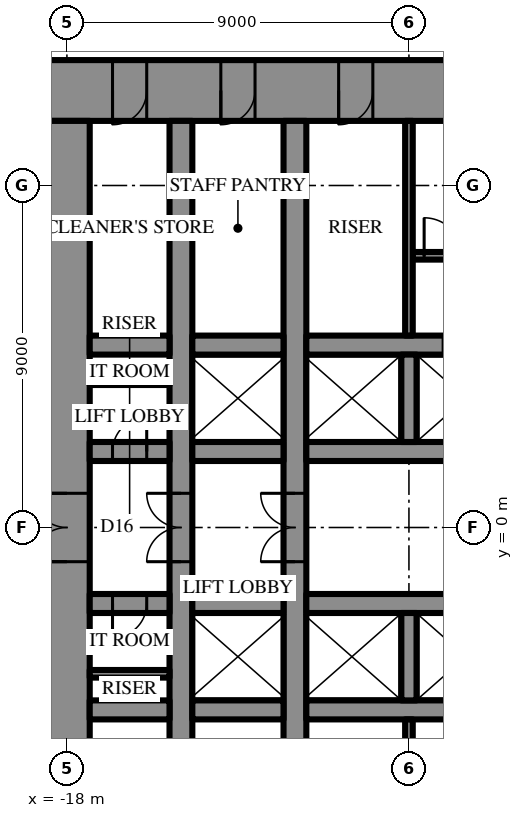
"""IFC4 building model, lengths in metres.
Left out: names, types, materials, properties, quantities, classifications, styles, units other than length and angle.
Written with IfcOpenShell. Run it as: python <this file> out.ifc"""

import sys

from ifc_helpers import new_model, si_unit, direction, frame, frame_2d, origin, place, context, subcontext, project, spatial, rectangle, extrude, element, fill, save


model = new_model("IFC4")
c1 = context("Model", 3, precision=1e-05, world=origin(), true_north=direction((0.0, 1.0)))
c2 = subcontext(c1, "Body", "Model", "MODEL_VIEW")
j1 = project(units=[si_unit("LENGTHUNIT", "METRE"), si_unit("PLANEANGLEUNIT", "RADIAN")], contexts=[c1])
p1 = place(None, origin())
s1 = spatial("IfcSite", under=j1, at=p1, CompositionType="ELEMENT")
p2 = place(p1, origin())
s2 = spatial("IfcBuilding", under=s1, at=p2, CompositionType="ELEMENT")
p3 = place(p2, frame((0.0, 0.0, 182.5)))
s3 = spatial("IfcBuildingStorey", under=s2, at=p3, CompositionType="ELEMENT", Elevation=182.5)
p4 = place(p3, frame((-18.6, 11.5, 0.0), z_axis=(0.0, 0.0, 1.0), x_axis=(1.0, 0.0, 0.0)))
e1 = element("IfcWall", 1, at=p4, inside=s3, PredefinedType="SHEAR", context=c2, shape_type="SweptSolid", body=[
    extrude(rectangle(XDim=37.2, YDim=1.6, at=frame_2d((18.6, 0.0))), origin(), (0.0, 0.0, 1.0), 4.2),
])
p5 = place(p4, frame((19.45, 0.0, 0.0)))
e2 = element("IfcOpeningElement", 2, at=p5, cuts=e1, PredefinedType="OPENING", context=c2, shape_type="SweptSolid", body=[
    extrude(rectangle(XDim=0.9, YDim=2.2, at=frame_2d((0.45, 1.1))), frame((0.0, 0.81, 0.0), z_axis=(0.0, -1.0, 0.0), x_axis=(1.0, 0.0, 0.0)), (0.0, 0.0, 1.0), 1.62),
])
p6 = place(p4, frame((22.45, 0.0, 0.0)))
e3 = element("IfcOpeningElement", 3, at=p6, cuts=e1, PredefinedType="OPENING", context=c2, shape_type="SweptSolid", body=[
    extrude(rectangle(XDim=0.9, YDim=2.2, at=frame_2d((0.45, 1.1))), frame((0.0, 0.81, 0.0), z_axis=(0.0, -1.0, 0.0), x_axis=(1.0, 0.0, 0.0)), (0.0, 0.0, 1.0), 1.62),
])
p7 = place(p4, frame((25.5, 0.0, 0.0)))
e4 = element("IfcOpeningElement", 4, at=p7, cuts=e1, PredefinedType="OPENING", context=c2, shape_type="SweptSolid", body=[
    extrude(rectangle(XDim=1.0, YDim=2.2, at=frame_2d((0.5, 1.1))), frame((0.0, 0.81, 0.0), z_axis=(0.0, -1.0, 0.0), x_axis=(1.0, 0.0, 0.0)), (0.0, 0.0, 1.0), 1.62),
])
p8 = place(p4, frame((1.8, 0.0, 0.0)))
e5 = element("IfcOpeningElement", 5, at=p8, cuts=e1, PredefinedType="OPENING", context=c2, shape_type="SweptSolid", body=[
    extrude(rectangle(XDim=0.9, YDim=2.2, at=frame_2d((0.45, 1.1))), frame((0.0, 0.81, 0.0), z_axis=(0.0, -1.0, 0.0), x_axis=(1.0, 0.0, 0.0)), (0.0, 0.0, 1.0), 1.62),
])
p9 = place(p4, frame((4.65, 0.0, 0.0)))
e6 = element("IfcOpeningElement", 6, at=p9, cuts=e1, PredefinedType="OPENING", context=c2, shape_type="SweptSolid", body=[
    extrude(rectangle(XDim=0.9, YDim=2.2, at=frame_2d((0.45, 1.1))), frame((0.0, 0.81, 0.0), z_axis=(0.0, -1.0, 0.0), x_axis=(1.0, 0.0, 0.0)), (0.0, 0.0, 1.0), 1.62),
])
p10 = place(p4, frame((7.75, 0.0, 0.0)))
e7 = element("IfcOpeningElement", 7, at=p10, cuts=e1, PredefinedType="OPENING", context=c2, shape_type="SweptSolid", body=[
    extrude(rectangle(XDim=0.9, YDim=2.2, at=frame_2d((0.45, 1.1))), frame((0.0, 0.81, 0.0), z_axis=(0.0, -1.0, 0.0), x_axis=(1.0, 0.0, 0.0)), (0.0, 0.0, 1.0), 1.62),
])
p11 = place(p4, frame((28.55, 0.0, 0.0)))
e8 = element("IfcOpeningElement", 8, at=p11, cuts=e1, PredefinedType="OPENING", context=c2, shape_type="SweptSolid", body=[
    extrude(rectangle(XDim=0.9, YDim=2.2, at=frame_2d((0.45, 1.1))), frame((0.0, 0.81, 0.0), z_axis=(0.0, -1.0, 0.0), x_axis=(1.0, 0.0, 0.0)), (0.0, 0.0, 1.0), 1.62),
])
p12 = place(p4, frame((31.65, 0.0, 0.0)))
e9 = element("IfcOpeningElement", 9, at=p12, cuts=e1, PredefinedType="OPENING", context=c2, shape_type="SweptSolid", body=[
    extrude(rectangle(XDim=0.9, YDim=2.2, at=frame_2d((0.45, 1.1))), frame((0.0, 0.81, 0.0), z_axis=(0.0, -1.0, 0.0), x_axis=(1.0, 0.0, 0.0)), (0.0, 0.0, 1.0), 1.62),
])
p13 = place(p4, frame((34.5, 0.0, 0.0)))
e10 = element("IfcOpeningElement", 10, at=p13, cuts=e1, PredefinedType="OPENING", context=c2, shape_type="SweptSolid", body=[
    extrude(rectangle(XDim=0.9, YDim=2.2, at=frame_2d((0.45, 1.1))), frame((0.0, 0.81, 0.0), z_axis=(0.0, -1.0, 0.0), x_axis=(1.0, 0.0, 0.0)), (0.0, 0.0, 1.0), 1.62),
])
p14 = place(p3, frame((-18.0, 10.7, 0.0), z_axis=(0.0, 0.0, 1.0), x_axis=(0.0, -1.0, 0.0)))
e11 = element("IfcWall", 11, at=p14, inside=s3, PredefinedType="SHEAR", context=c2, shape_type="SweptSolid", body=[
    extrude(rectangle(XDim=21.4, YDim=1.2, at=frame_2d((10.7, 0.0))), origin(), (0.0, 0.0, 1.0), 4.2),
])
p15 = place(p14, frame((9.8, 0.0, 0.0)))
e12 = element("IfcOpeningElement", 12, at=p15, cuts=e11, PredefinedType="OPENING", context=c2, shape_type="SweptSolid", body=[
    extrude(rectangle(XDim=1.8, YDim=2.4, at=frame_2d((0.9, 1.2))), frame((0.0, 0.61, 0.0), z_axis=(0.0, -1.0, 0.0), x_axis=(1.0, 0.0, 0.0)), (0.0, 0.0, 1.0), 1.22),
])
p16 = place(p3, frame((-12.0, -10.7, 0.0), z_axis=(0.0, 0.0, 1.0), x_axis=(0.0, 1.0, 0.0)))
e13 = element("IfcWall", 13, at=p16, inside=s3, PredefinedType="SHEAR", context=c2, shape_type="SweptSolid", body=[
    extrude(rectangle(XDim=21.4, YDim=0.6, at=frame_2d((10.7, 0.0))), origin(), (0.0, 0.0, 1.0), 4.2),
])
p17 = place(p16, frame((9.8, 0.0, 0.0)))
e14 = element("IfcOpeningElement", 14, at=p17, cuts=e13, PredefinedType="OPENING", context=c2, shape_type="SweptSolid", body=[
    extrude(rectangle(XDim=1.8, YDim=2.4, at=frame_2d((0.9, 1.2))), frame((0.0, 0.31, 0.0), z_axis=(0.0, -1.0, 0.0), x_axis=(1.0, 0.0, 0.0)), (0.0, 0.0, 1.0), 0.62),
])
p18 = place(p3, frame((-15.0, -10.7, 0.0), z_axis=(0.0, 0.0, 1.0), x_axis=(0.0, 1.0, 0.0)))
e15 = element("IfcWall", 15, at=p18, inside=s3, PredefinedType="SHEAR", context=c2, shape_type="SweptSolid", body=[
    extrude(rectangle(XDim=21.4, YDim=0.6, at=frame_2d((10.7, 0.0))), origin(), (0.0, 0.0, 1.0), 4.2),
])
p19 = place(p18, frame((9.8, 0.0, 0.0)))
e16 = element("IfcOpeningElement", 16, at=p19, cuts=e15, PredefinedType="OPENING", context=c2, shape_type="SweptSolid", body=[
    extrude(rectangle(XDim=1.8, YDim=2.4, at=frame_2d((0.9, 1.2))), frame((0.0, 0.31, 0.0), z_axis=(0.0, -1.0, 0.0), x_axis=(1.0, 0.0, 0.0)), (0.0, 0.0, 1.0), 0.62),
])
p20 = place(p3, frame((-17.4, 2.0, 0.0), z_axis=(0.0, 0.0, 1.0), x_axis=(1.0, 0.0, 0.0)))
e17 = element("IfcWall", 17, at=p20, inside=s3, PredefinedType="SHEAR", context=c2, shape_type="SweptSolid", body=[
    extrude(rectangle(XDim=2.1, YDim=0.5, at=frame_2d((1.05, 0.0))), origin(), (0.0, 0.0, 1.0), 4.2),
])
p21 = place(p20, frame((0.6, 0.0, 0.0)))
e18 = element("IfcOpeningElement", 18, at=p21, cuts=e17, PredefinedType="OPENING", context=c2, shape_type="SweptSolid", body=[
    extrude(rectangle(XDim=0.9, YDim=2.2, at=frame_2d((0.45, 1.1))), frame((0.0, 0.26, 0.0), z_axis=(0.0, -1.0, 0.0), x_axis=(1.0, 0.0, 0.0)), (0.0, 0.0, 1.0), 0.52),
])
p22 = place(p3, frame((-14.7, 2.0, 0.0), z_axis=(0.0, 0.0, 1.0), x_axis=(1.0, 0.0, 0.0)))
e19 = element("IfcWall", 19, at=p22, inside=s3, PredefinedType="SHEAR", context=c2, shape_type="SweptSolid", body=[
    extrude(rectangle(XDim=2.4, YDim=0.5, at=frame_2d((1.2, 0.0))), origin(), (0.0, 0.0, 1.0), 4.2),
])
p23 = place(p3, frame((-11.7, 2.0, 0.0), z_axis=(0.0, 0.0, 1.0), x_axis=(1.0, 0.0, 0.0)))
e20 = element("IfcWall", 20, at=p23, inside=s3, PredefinedType="SHEAR", context=c2, shape_type="SweptSolid", body=[
    extrude(rectangle(XDim=5.9, YDim=0.5, at=frame_2d((2.95, 0.0))), origin(), (0.0, 0.0, 1.0), 4.2),
])
p24 = place(p3, frame((-17.4, 4.8, 0.0), z_axis=(0.0, 0.0, 1.0), x_axis=(1.0, 0.0, 0.0)))
e21 = element("IfcWall", 21, at=p24, inside=s3, PredefinedType="SHEAR", context=c2, shape_type="SweptSolid", body=[
    extrude(rectangle(XDim=2.1, YDim=0.5, at=frame_2d((1.05, 0.0))), origin(), (0.0, 0.0, 1.0), 4.2),
])
p25 = place(p3, frame((-14.7, 4.8, 0.0), z_axis=(0.0, 0.0, 1.0), x_axis=(1.0, 0.0, 0.0)))
e22 = element("IfcWall", 22, at=p25, inside=s3, PredefinedType="SHEAR", context=c2, shape_type="SweptSolid", body=[
    extrude(rectangle(XDim=2.4, YDim=0.5, at=frame_2d((1.2, 0.0))), origin(), (0.0, 0.0, 1.0), 4.2),
])
p26 = place(p3, frame((-11.7, 4.8, 0.0), z_axis=(0.0, 0.0, 1.0), x_axis=(1.0, 0.0, 0.0)))
e23 = element("IfcWall", 23, at=p26, inside=s3, PredefinedType="SHEAR", context=c2, shape_type="SweptSolid", body=[
    extrude(rectangle(XDim=23.4, YDim=0.5, at=frame_2d((11.7, 0.0))), origin(), (0.0, 0.0, 1.0), 4.2),
])
p27 = place(p26, frame((6.6, 0.0, 0.0)))
e24 = element("IfcOpeningElement", 24, at=p27, cuts=e23, PredefinedType="OPENING", context=c2, shape_type="SweptSolid", body=[
    extrude(rectangle(XDim=1.2, YDim=2.2, at=frame_2d((0.6, 1.1))), frame((0.0, 0.26, 0.0), z_axis=(0.0, -1.0, 0.0), x_axis=(1.0, 0.0, 0.0)), (0.0, 0.0, 1.0), 0.52),
])
p28 = place(p26, frame((3.6, 0.0, 0.0)))
e25 = element("IfcOpeningElement", 25, at=p28, cuts=e23, PredefinedType="OPENING", context=c2, shape_type="SweptSolid", body=[
    extrude(rectangle(XDim=1.2, YDim=2.2, at=frame_2d((0.6, 1.1))), frame((0.0, 0.26, 0.0), z_axis=(0.0, -1.0, 0.0), x_axis=(1.0, 0.0, 0.0)), (0.0, 0.0, 1.0), 0.52),
])
p29 = place(p3, frame((-9.0, 2.25, 0.0), z_axis=(0.0, 0.0, 1.0), x_axis=(0.0, 1.0, 0.0)))
e26 = element("IfcWall", 26, at=p29, inside=s3, PredefinedType="SHEAR", context=c2, shape_type="SweptSolid", body=[
    extrude(rectangle(XDim=2.3, YDim=0.4, at=frame_2d((1.15, 0.0))), origin(), (0.0, 0.0, 1.0), 4.2),
])
p30 = place(p3, frame((-8.9, 7.15, 0.0), z_axis=(0.0, 0.0, 1.0), x_axis=(1.0, 0.0, 0.0)))
e27 = element("IfcWall", 27, at=p30, inside=s3, PredefinedType="SHEAR", context=c2, shape_type="SweptSolid", body=[
    extrude(rectangle(XDim=8.6, YDim=0.2, at=frame_2d((4.3, 0.0))), origin(), (0.0, 0.0, 1.0), 4.2),
])
p31 = place(p30, frame((0.3, 0.0, 0.0)))
e28 = element("IfcOpeningElement", 28, at=p31, cuts=e27, PredefinedType="OPENING", context=c2, shape_type="SweptSolid", body=[
    extrude(rectangle(XDim=1.0, YDim=2.2, at=frame_2d((0.5, 1.1))), frame((0.0, 0.11, 0.0), z_axis=(0.0, -1.0, 0.0), x_axis=(1.0, 0.0, 0.0)), (0.0, 0.0, 1.0), 0.22),
])
p32 = place(p3, frame((3.2, -2.0, 0.0), z_axis=(0.0, 0.0, 1.0), x_axis=(-1.0, 0.0, 0.0)))
e29 = element("IfcWall", 29, at=p32, inside=s3, PredefinedType="SHEAR", context=c2, shape_type="SweptSolid", body=[
    extrude(rectangle(XDim=14.9, YDim=0.5, at=frame_2d((7.45, 0.0))), origin(), (0.0, 0.0, 1.0), 4.2),
])
p33 = place(p32, frame((1.15, 0.0, 0.0)))
e30 = element("IfcOpeningElement", 30, at=p33, cuts=e29, PredefinedType="OPENING", context=c2, shape_type="SweptSolid", body=[
    extrude(rectangle(XDim=1.1, YDim=2.2, at=frame_2d((0.55, 1.1))), frame((0.0, 0.26, 0.0), z_axis=(0.0, -1.0, 0.0), x_axis=(1.0, 0.0, 0.0)), (0.0, 0.0, 1.0), 0.52),
])
p34 = place(p32, frame((4.15, 0.0, 0.0)))
e31 = element("IfcOpeningElement", 31, at=p34, cuts=e29, PredefinedType="OPENING", context=c2, shape_type="SweptSolid", body=[
    extrude(rectangle(XDim=1.1, YDim=2.2, at=frame_2d((0.55, 1.1))), frame((0.0, 0.26, 0.0), z_axis=(0.0, -1.0, 0.0), x_axis=(1.0, 0.0, 0.0)), (0.0, 0.0, 1.0), 0.52),
])
p35 = place(p32, frame((7.15, 0.0, 0.0)))
e32 = element("IfcOpeningElement", 32, at=p35, cuts=e29, PredefinedType="OPENING", context=c2, shape_type="SweptSolid", body=[
    extrude(rectangle(XDim=1.1, YDim=2.2, at=frame_2d((0.55, 1.1))), frame((0.0, 0.26, 0.0), z_axis=(0.0, -1.0, 0.0), x_axis=(1.0, 0.0, 0.0)), (0.0, 0.0, 1.0), 0.52),
])
p36 = place(p32, frame((10.15, 0.0, 0.0)))
e33 = element("IfcOpeningElement", 33, at=p36, cuts=e29, PredefinedType="OPENING", context=c2, shape_type="SweptSolid", body=[
    extrude(rectangle(XDim=1.1, YDim=2.2, at=frame_2d((0.55, 1.1))), frame((0.0, 0.26, 0.0), z_axis=(0.0, -1.0, 0.0), x_axis=(1.0, 0.0, 0.0)), (0.0, 0.0, 1.0), 0.52),
])
p37 = place(p3, frame((-12.3, -2.0, 0.0), z_axis=(0.0, 0.0, 1.0), x_axis=(-1.0, 0.0, 0.0)))
e34 = element("IfcWall", 34, at=p37, inside=s3, PredefinedType="SHEAR", context=c2, shape_type="SweptSolid", body=[
    extrude(rectangle(XDim=2.4, YDim=0.5, at=frame_2d((1.2, 0.0))), origin(), (0.0, 0.0, 1.0), 4.2),
])
p38 = place(p3, frame((-15.3, -2.0, 0.0), z_axis=(0.0, 0.0, 1.0), x_axis=(-1.0, 0.0, 0.0)))
e35 = element("IfcWall", 35, at=p38, inside=s3, PredefinedType="SHEAR", context=c2, shape_type="SweptSolid", body=[
    extrude(rectangle(XDim=2.1, YDim=0.5, at=frame_2d((1.05, 0.0))), origin(), (0.0, 0.0, 1.0), 4.2),
])
p39 = place(p38, frame((0.6, 0.0, 0.0)))
e36 = element("IfcOpeningElement", 36, at=p39, cuts=e35, PredefinedType="OPENING", context=c2, shape_type="SweptSolid", body=[
    extrude(rectangle(XDim=0.9, YDim=2.2, at=frame_2d((0.45, 1.1))), frame((0.0, 0.26, 0.0), z_axis=(0.0, -1.0, 0.0), x_axis=(1.0, 0.0, 0.0)), (0.0, 0.0, 1.0), 0.52),
])
p40 = place(p3, frame((11.7, -4.8, 0.0), z_axis=(0.0, 0.0, 1.0), x_axis=(-1.0, 0.0, 0.0)))
e37 = element("IfcWall", 37, at=p40, inside=s3, PredefinedType="SHEAR", context=c2, shape_type="SweptSolid", body=[
    extrude(rectangle(XDim=23.4, YDim=0.5, at=frame_2d((11.7, 0.0))), origin(), (0.0, 0.0, 1.0), 4.2),
])
p41 = place(p40, frame((6.6, 0.0, 0.0)))
e38 = element("IfcOpeningElement", 38, at=p41, cuts=e37, PredefinedType="OPENING", context=c2, shape_type="SweptSolid", body=[
    extrude(rectangle(XDim=1.2, YDim=2.2, at=frame_2d((0.6, 1.1))), frame((0.0, 0.26, 0.0), z_axis=(0.0, -1.0, 0.0), x_axis=(1.0, 0.0, 0.0)), (0.0, 0.0, 1.0), 0.52),
])
p42 = place(p40, frame((3.6, 0.0, 0.0)))
e39 = element("IfcOpeningElement", 39, at=p42, cuts=e37, PredefinedType="OPENING", context=c2, shape_type="SweptSolid", body=[
    extrude(rectangle(XDim=1.2, YDim=2.2, at=frame_2d((0.6, 1.1))), frame((0.0, 0.26, 0.0), z_axis=(0.0, -1.0, 0.0), x_axis=(1.0, 0.0, 0.0)), (0.0, 0.0, 1.0), 0.52),
])
p43 = place(p3, frame((-12.3, -4.8, 0.0), z_axis=(0.0, 0.0, 1.0), x_axis=(-1.0, 0.0, 0.0)))
e40 = element("IfcWall", 40, at=p43, inside=s3, PredefinedType="SHEAR", context=c2, shape_type="SweptSolid", body=[
    extrude(rectangle(XDim=2.4, YDim=0.5, at=frame_2d((1.2, 0.0))), origin(), (0.0, 0.0, 1.0), 4.2),
])
p44 = place(p3, frame((-15.3, -4.8, 0.0), z_axis=(0.0, 0.0, 1.0), x_axis=(-1.0, 0.0, 0.0)))
e41 = element("IfcWall", 41, at=p44, inside=s3, PredefinedType="SHEAR", context=c2, shape_type="SweptSolid", body=[
    extrude(rectangle(XDim=2.1, YDim=0.5, at=frame_2d((1.05, 0.0))), origin(), (0.0, 0.0, 1.0), 4.2),
])
p45 = place(p3, frame((-9.0, -2.25, 0.0), z_axis=(0.0, 0.0, 1.0), x_axis=(0.0, -1.0, 0.0)))
e42 = element("IfcWall", 42, at=p45, inside=s3, PredefinedType="SHEAR", context=c2, shape_type="SweptSolid", body=[
    extrude(rectangle(XDim=2.3, YDim=0.4, at=frame_2d((1.15, 0.0))), origin(), (0.0, 0.0, 1.0), 4.2),
])
for number, where, z_axis, x_axis in (
    (43, (-9.0, 5.05, 0.0), (0.0, 0.0, 1.0), (0.0, 1.0, 0.0)),
    (44, (-9.0, -5.05, 0.0), (0.0, 0.0, 1.0), (0.0, -1.0, 0.0)),
):
    element("IfcWall", number, at=place(p3, frame(where, z_axis=z_axis, x_axis=x_axis)), inside=s3, PredefinedType="PARTITIONING", context=c2, shape_type="SweptSolid", body=[
        extrude(rectangle(XDim=5.65, YDim=0.2, at=frame_2d((2.825, 0.0))), origin(), (0.0, 0.0, 1.0), 4.0),
    ])
for number, where, z_axis, x_axis in (
    (45, (-17.4, 3.85, 0.0), (0.0, 0.0, 1.0), (1.0, 0.0, 0.0)),
    (46, (-15.3, -3.85, 0.0), (0.0, 0.0, 1.0), (-1.0, 0.0, 0.0)),
):
    element("IfcWall", number, at=place(p3, frame(where, z_axis=z_axis, x_axis=x_axis)), inside=s3, PredefinedType="PARTITIONING", context=c2, shape_type="SweptSolid", body=[
        extrude(rectangle(XDim=2.1, YDim=0.2, at=frame_2d((1.05, 0.0))), origin(), (0.0, 0.0, 1.0), 4.0),
    ])
p46 = place(p15, frame((1.8, 0.0, 0.0), z_axis=(0.0, 0.0, 1.0), x_axis=(-1.0, 0.0, 0.0)))
e47 = element("IfcDoor", 47, at=p46, inside=s3, OperationType="DOUBLE_DOOR_SINGLE_SWING", PredefinedType="DOOR", context=c2, shape_type="SweptSolid", body=[
    extrude(rectangle(XDim=1.8, YDim=2.4, at=frame_2d((0.9, 1.2))), frame((0.0, 0.025, 0.0), z_axis=(0.0, -1.0, 0.0), x_axis=(1.0, 0.0, 0.0)), (0.0, 0.0, 1.0), 0.05),
])
fill(e12, e47)
p47 = place(p31, origin())
e48 = element("IfcDoor", 48, at=p47, inside=s3, OperationType="SINGLE_SWING_RIGHT", PredefinedType="DOOR", context=c2, shape_type="SweptSolid", body=[
    extrude(rectangle(XDim=1.0, YDim=2.2, at=frame_2d((0.5, 1.1))), frame((0.0, 0.025, 0.0), z_axis=(0.0, -1.0, 0.0), x_axis=(1.0, 0.0, 0.0)), (0.0, 0.0, 1.0), 0.05),
])
fill(e28, e48)
p48 = place(p8, frame((0.9, 0.0, 0.0), z_axis=(0.0, 0.0, 1.0), x_axis=(-1.0, 0.0, 0.0)))
e49 = element("IfcDoor", 49, at=p48, inside=s3, OperationType="SINGLE_SWING_LEFT", PredefinedType="DOOR", context=c2, shape_type="SweptSolid", body=[
    extrude(rectangle(XDim=0.9, YDim=2.2, at=frame_2d((0.45, 1.1))), frame((0.0, 0.025, 0.0), z_axis=(0.0, -1.0, 0.0), x_axis=(1.0, 0.0, 0.0)), (0.0, 0.0, 1.0), 0.05),
])
fill(e5, e49)
p49 = place(p9, frame((0.9, 0.0, 0.0), z_axis=(0.0, 0.0, 1.0), x_axis=(-1.0, 0.0, 0.0)))
e50 = element("IfcDoor", 50, at=p49, inside=s3, OperationType="SINGLE_SWING_LEFT", PredefinedType="DOOR", context=c2, shape_type="SweptSolid", body=[
    extrude(rectangle(XDim=0.9, YDim=2.2, at=frame_2d((0.45, 1.1))), frame((0.0, 0.025, 0.0), z_axis=(0.0, -1.0, 0.0), x_axis=(1.0, 0.0, 0.0)), (0.0, 0.0, 1.0), 0.05),
])
fill(e6, e50)
p50 = place(p10, frame((0.9, 0.0, 0.0), z_axis=(0.0, 0.0, 1.0), x_axis=(-1.0, 0.0, 0.0)))
e51 = element("IfcDoor", 51, at=p50, inside=s3, OperationType="SINGLE_SWING_LEFT", PredefinedType="DOOR", context=c2, shape_type="SweptSolid", body=[
    extrude(rectangle(XDim=0.9, YDim=2.2, at=frame_2d((0.45, 1.1))), frame((0.0, 0.025, 0.0), z_axis=(0.0, -1.0, 0.0), x_axis=(1.0, 0.0, 0.0)), (0.0, 0.0, 1.0), 0.05),
])
fill(e7, e51)
p51 = place(p21, origin())
e52 = element("IfcDoor", 52, at=p51, inside=s3, OperationType="SINGLE_SWING_LEFT", PredefinedType="DOOR", context=c2, shape_type="SweptSolid", body=[
    extrude(rectangle(XDim=0.9, YDim=2.2, at=frame_2d((0.45, 1.1))), frame((0.0, 0.025, 0.0), z_axis=(0.0, -1.0, 0.0), x_axis=(1.0, 0.0, 0.0)), (0.0, 0.0, 1.0), 0.05),
])
fill(e18, e52)
p52 = place(p39, origin())
e53 = element("IfcDoor", 53, at=p52, inside=s3, OperationType="SINGLE_SWING_LEFT", PredefinedType="DOOR", context=c2, shape_type="SweptSolid", body=[
    extrude(rectangle(XDim=0.9, YDim=2.2, at=frame_2d((0.45, 1.1))), frame((0.0, 0.025, 0.0), z_axis=(0.0, -1.0, 0.0), x_axis=(1.0, 0.0, 0.0)), (0.0, 0.0, 1.0), 0.05),
])
fill(e36, e53)
p53 = place(p17, origin())
e54 = element("IfcDoor", 54, at=p53, inside=s3, OperationType="DOUBLE_DOOR_SINGLE_SWING", PredefinedType="DOOR", context=c2, shape_type="SweptSolid", body=[
    extrude(rectangle(XDim=1.8, YDim=2.4, at=frame_2d((0.9, 1.2))), frame((0.0, 0.025, 0.0), z_axis=(0.0, -1.0, 0.0), x_axis=(1.0, 0.0, 0.0)), (0.0, 0.0, 1.0), 0.05),
])
fill(e14, e54)
p54 = place(p19, origin())
e55 = element("IfcDoor", 55, at=p54, inside=s3, OperationType="DOUBLE_DOOR_SINGLE_SWING", PredefinedType="DOOR", context=c2, shape_type="SweptSolid", body=[
    extrude(rectangle(XDim=1.8, YDim=2.4, at=frame_2d((0.9, 1.2))), frame((0.0, 0.025, 0.0), z_axis=(0.0, -1.0, 0.0), x_axis=(1.0, 0.0, 0.0)), (0.0, 0.0, 1.0), 0.05),
])
fill(e16, e55)
save(model, sys.argv[1])
